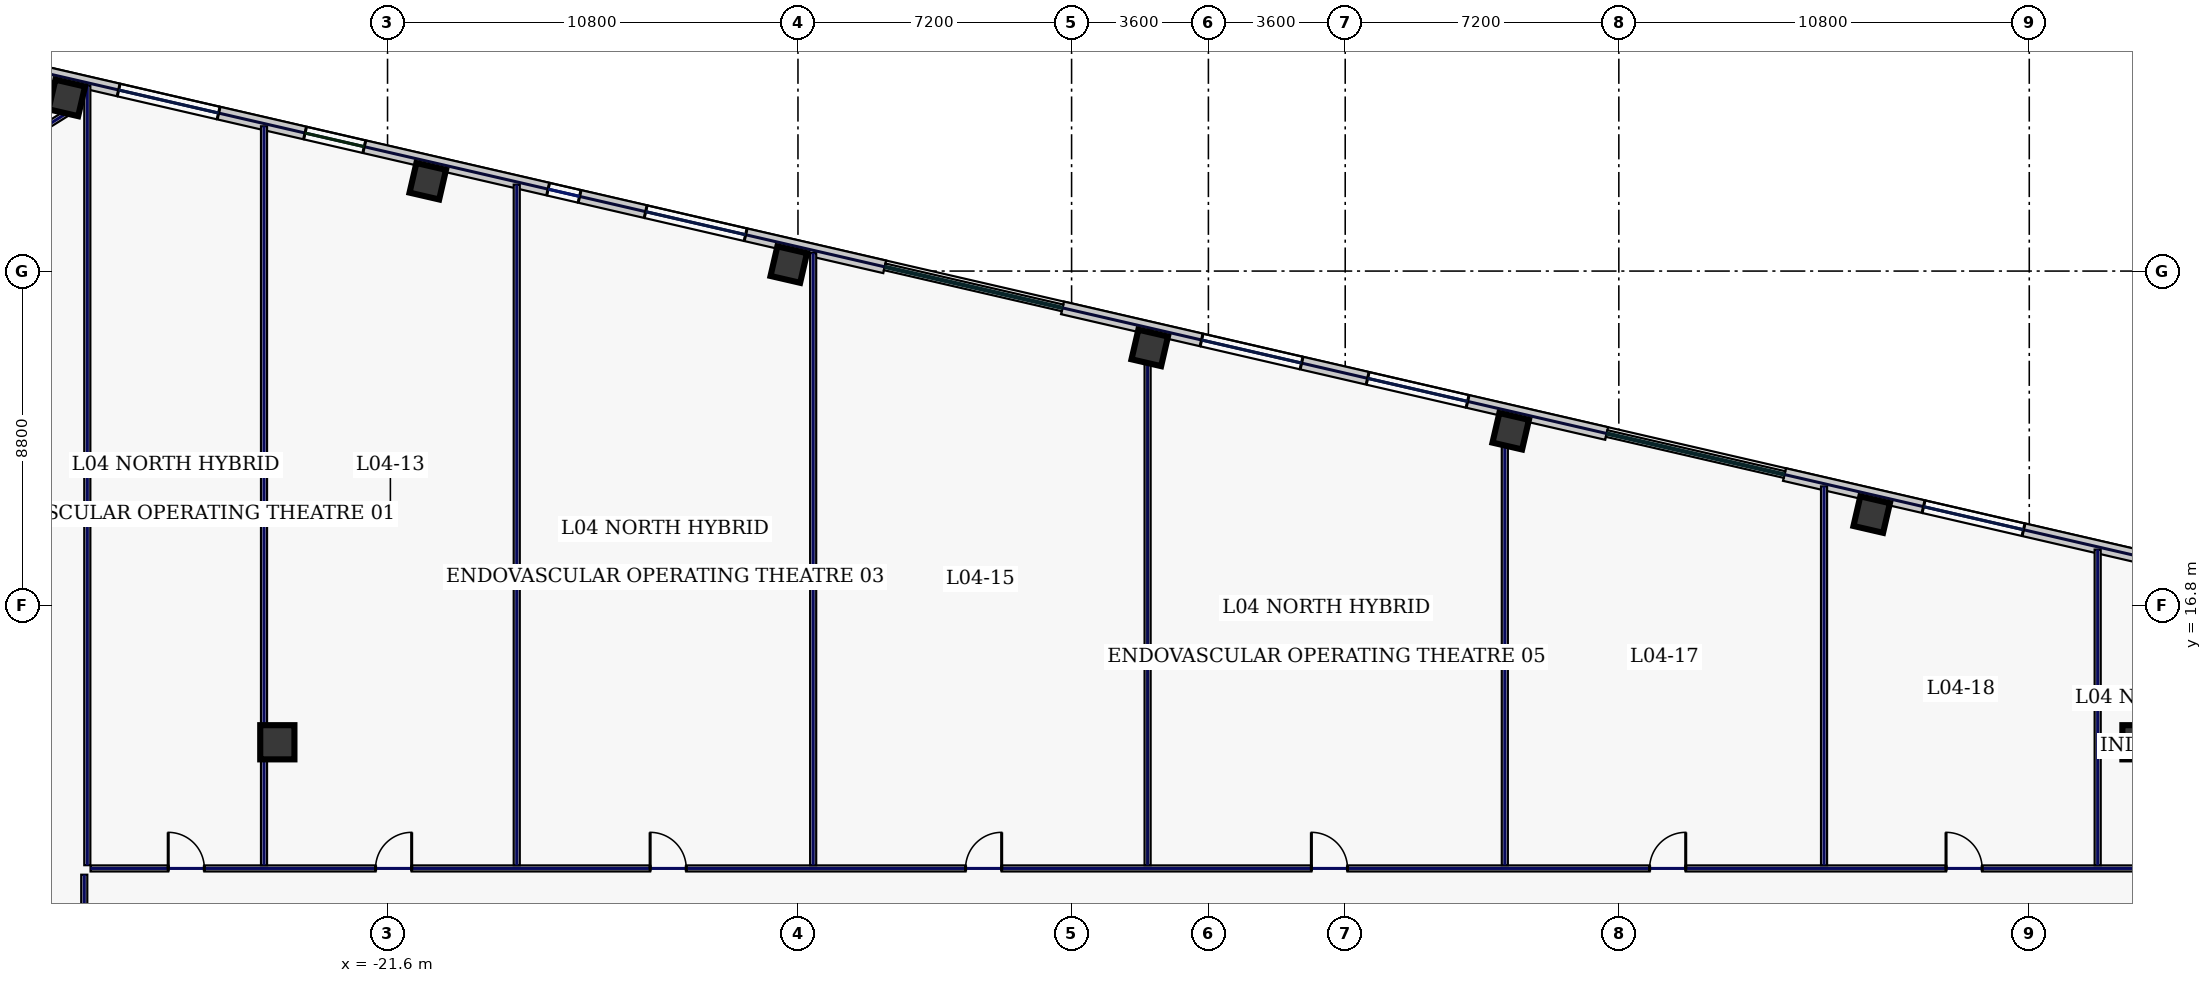
"""IFC4 building model, lengths in metres.
Left out: names, types, materials, properties, quantities, classifications, styles, units other than length and angle.
Written with IfcOpenShell. Run it as: python <this file> out.ifc"""

import sys

from ifc_helpers import new_model, si_unit, direction, frame, frame_2d, origin, origin_2d, place, context, subcontext, project, spatial, rectangle, hollow_rectangle, extrude, element, fill, save


model = new_model("IFC4")
c1 = context("Model", 3, precision=1e-05, world=origin(), true_north=direction((0.0, 1.0)))
c2 = subcontext(c1, "Body", "Model", "MODEL_VIEW")
j1 = project(units=[si_unit("LENGTHUNIT", "METRE"), si_unit("PLANEANGLEUNIT", "RADIAN")], contexts=[c1])
p1 = place(None, origin())
s1 = spatial("IfcSite", under=j1, at=p1, CompositionType="ELEMENT")
p2 = place(p1, origin())
s2 = spatial("IfcBuilding", under=s1, at=p2, CompositionType="ELEMENT")
p3 = place(p2, frame((0.0, 0.0, 23.4)))
s3 = spatial("IfcBuildingStorey", under=s2, at=p3, CompositionType="ELEMENT", Elevation=23.4)
for number, where, z_axis, x_axis in (
    (1, (-24.5, 13.2, 0.0), (0.0, 0.0, 1.0), (1.0, 0.0, 0.0)),
    (2, (24.5, 13.2, 0.0), (0.0, 0.0, 1.0), (1.0, 0.0, 0.0)),
):
    element("IfcColumn", number, at=place(p3, frame(where, z_axis=z_axis, x_axis=x_axis)), inside=s3, PredefinedType="COLUMN", context=c2, shape_type="SweptSolid", body=[
        extrude(hollow_rectangle(XDim=0.9, YDim=0.9, WallThickness=0.04, at=origin_2d()), origin(), (0.0, 0.0, 1.0), 4.7),
    ])
for number, where, z_axis, x_axis in (
    (3, (17.454, 19.192, 0.0), (0.0, 0.0, 1.0), (0.974, -0.225, 0.0)),
    (4, (7.955, 21.385, 0.0), (0.0, 0.0, 1.0), (0.974, -0.225, 0.0)),
    (5, (-1.544, 23.578, 0.0), (0.0, 0.0, 1.0), (0.974, -0.225, 0.0)),
    (6, (-11.042, 25.771, 0.0), (0.0, 0.0, 1.0), (0.974, -0.225, 0.0)),
    (7, (-20.541, 27.964, 0.0), (0.0, 0.0, 1.0), (0.974, -0.225, 0.0)),
    (8, (-30.04, 30.156, 0.0), (0.0, 0.0, 1.0), (0.974, -0.225, 0.0)),
):
    element("IfcColumn", number, at=place(p3, frame(where, z_axis=z_axis, x_axis=x_axis)), inside=s3, PredefinedType="COLUMN", context=c2, shape_type="SweptSolid", body=[
        extrude(hollow_rectangle(XDim=0.8, YDim=0.8, WallThickness=0.036, at=origin_2d()), origin(), (0.0, 0.0, 1.0), 4.7),
    ])
p4 = place(p3, frame((37.229, 15.15, 0.0), z_axis=(0.0, 0.0, 1.0), x_axis=(-0.97436993772, 0.224951604723, 0.0)))
e9 = element("IfcWall", 9, at=p4, inside=s3, PredefinedType="STANDARD", context=c2, shape_type="SweptSolid", body=[
    extrude(rectangle(XDim=22.651, YDim=0.34, at=frame_2d((11.326, 0.0))), origin(), (0.0, 0.0, 1.0), 4.7),
])
p5 = place(p4, frame((16.195, 0.0, 0.9)))
e10 = element("IfcOpeningElement", 10, at=p5, cuts=e9, PredefinedType="OPENING", context=c2, shape_type="SweptSolid", body=[
    extrude(rectangle(XDim=2.7, YDim=2.2, at=frame_2d((1.35, 1.1))), frame((0.0, 0.18, 0.0), z_axis=(0.0, -1.0, 0.0), x_axis=(1.0, 0.0, 0.0)), (0.0, 0.0, 1.0), 0.36),
])
p6 = place(p4, frame((11.711, 0.0, 0.9)))
e11 = element("IfcOpeningElement", 11, at=p6, cuts=e9, PredefinedType="OPENING", context=c2, shape_type="SweptSolid", body=[
    extrude(rectangle(XDim=0.85, YDim=1.85, at=frame_2d((0.425, 0.925))), frame((0.0, 0.18, 0.0), z_axis=(0.0, -1.0, 0.0), x_axis=(1.0, 0.0, 0.0)), (0.0, 0.0, 1.0), 0.36),
])
p7 = place(p4, frame((6.447, 0.0, 0.9)))
e12 = element("IfcOpeningElement", 12, at=p7, cuts=e9, PredefinedType="OPENING", context=c2, shape_type="SweptSolid", body=[
    extrude(rectangle(XDim=0.85, YDim=1.85, at=frame_2d((0.425, 0.925))), frame((0.0, 0.18, 0.0), z_axis=(0.0, -1.0, 0.0), x_axis=(1.0, 0.0, 0.0)), (0.0, 0.0, 1.0), 0.36),
])
p8 = place(p4, frame((1.962, 0.0, 0.9)))
e13 = element("IfcOpeningElement", 13, at=p8, cuts=e9, PredefinedType="OPENING", context=c2, shape_type="SweptSolid", body=[
    extrude(rectangle(XDim=2.7, YDim=2.2, at=frame_2d((1.35, 1.1))), frame((0.0, 0.18, 0.0), z_axis=(0.0, -1.0, 0.0), x_axis=(1.0, 0.0, 0.0)), (0.0, 0.0, 1.0), 0.36),
])
p9 = place(p3, frame((10.481, 21.325, 0.0), z_axis=(0.0, 0.0, 1.0), x_axis=(-0.974369353393, 0.2249541357, 0.0)))
e14 = element("IfcWall", 14, at=p9, inside=s3, PredefinedType="STANDARD", context=c2, shape_type="SweptSolid", body=[
    extrude(rectangle(XDim=14.697, YDim=0.34, at=frame_2d((7.349, 0.0))), origin(), (0.0, 0.0, 1.0), 4.7),
])
p10 = place(p9, frame((8.241, 0.0, 0.9)))
e15 = element("IfcOpeningElement", 15, at=p10, cuts=e14, PredefinedType="OPENING", context=c2, shape_type="SweptSolid", body=[
    extrude(rectangle(XDim=2.7, YDim=2.2, at=frame_2d((1.35, 1.1))), frame((0.0, 0.18, 0.0), z_axis=(0.0, -1.0, 0.0), x_axis=(1.0, 0.0, 0.0)), (0.0, 0.0, 1.0), 0.36),
])
p11 = place(p9, frame((3.756, 0.0, 0.9)))
e16 = element("IfcOpeningElement", 16, at=p11, cuts=e14, PredefinedType="OPENING", context=c2, shape_type="SweptSolid", body=[
    extrude(rectangle(XDim=2.7, YDim=2.2, at=frame_2d((1.35, 1.1))), frame((0.0, 0.18, 0.0), z_axis=(0.0, -1.0, 0.0), x_axis=(1.0, 0.0, 0.0)), (0.0, 0.0, 1.0), 0.36),
])
p12 = place(p3, frame((-8.517, 25.711, 0.0), z_axis=(0.0, 0.0, 1.0), x_axis=(-0.974372845456, 0.224939009598, 0.0)))
e17 = element("IfcWall", 17, at=p12, inside=s3, PredefinedType="STANDARD", context=c2, shape_type="SweptSolid", body=[
    extrude(rectangle(XDim=22.652, YDim=0.34, at=frame_2d((11.326, 0.0))), origin(), (0.0, 0.0, 1.0), 4.7),
])
p13 = place(p12, frame((17.989, 0.0, 0.9)))
e18 = element("IfcOpeningElement", 18, at=p13, cuts=e17, PredefinedType="OPENING", context=c2, shape_type="SweptSolid", body=[
    extrude(rectangle(XDim=2.7, YDim=2.2, at=frame_2d((1.35, 1.1))), frame((0.0, 0.18, 0.0), z_axis=(0.0, -1.0, 0.0), x_axis=(1.0, 0.0, 0.0)), (0.0, 0.0, 1.0), 0.36),
])
p14 = place(p12, frame((14.055, 0.0, 0.22)))
e19 = element("IfcOpeningElement", 19, at=p14, cuts=e17, PredefinedType="OPENING", context=c2, shape_type="SweptSolid", body=[
    extrude(rectangle(XDim=1.6, YDim=1.2, at=frame_2d((0.8, 0.6))), frame((0.0, 0.18, 0.0), z_axis=(0.0, -1.0, 0.0), x_axis=(1.0, 0.0, 0.0)), (0.0, 0.0, 1.0), 0.36),
])
p15 = place(p12, frame((8.241, 0.0, 0.9)))
e20 = element("IfcOpeningElement", 20, at=p15, cuts=e17, PredefinedType="OPENING", context=c2, shape_type="SweptSolid", body=[
    extrude(rectangle(XDim=0.85, YDim=1.85, at=frame_2d((0.425, 0.925))), frame((0.0, 0.18, 0.0), z_axis=(0.0, -1.0, 0.0), x_axis=(1.0, 0.0, 0.0)), (0.0, 0.0, 1.0), 0.36),
])
p16 = place(p12, frame((3.756, 0.0, 0.9)))
e21 = element("IfcOpeningElement", 21, at=p16, cuts=e17, PredefinedType="OPENING", context=c2, shape_type="SweptSolid", body=[
    extrude(rectangle(XDim=2.7, YDim=2.2, at=frame_2d((1.35, 1.1))), frame((0.0, 0.18, 0.0), z_axis=(0.0, -1.0, 0.0), x_axis=(1.0, 0.0, 0.0)), (0.0, 0.0, 1.0), 0.36),
])
p17 = place(p3, frame((-29.86, 29.868, 0.0), z_axis=(0.0, 0.0, 1.0), x_axis=(-0.848043064089, -0.529927317139, 0.0)))
e22 = element("IfcWall", 22, at=p17, inside=s3, PredefinedType="PARTITIONING", context=c2, shape_type="SweptSolid", body=[
    extrude(rectangle(XDim=7.354, YDim=0.16, at=frame_2d((3.677, 0.0))), origin(), (0.0, 0.0, 1.0), 4.7),
])
p18 = place(p3, frame((-29.58, -9.715, 0.0), z_axis=(0.0, 0.0, 1.0), x_axis=(0.0, 1.0, 0.0)))
e23 = element("IfcWall", 23, at=p18, inside=s3, PredefinedType="PARTITIONING", context=c2, shape_type="SweptSolid", body=[
    extrude(rectangle(XDim=19.43, YDim=0.16, at=frame_2d((9.715, 0.0))), origin(), (0.0, 0.0, 1.0), 4.7),
])
p19 = place(p18, frame((2.019, 0.0, 0.0)))
e24 = element("IfcOpeningElement", 24, at=p19, cuts=e23, PredefinedType="OPENING", context=c2, shape_type="SweptSolid", body=[
    extrude(rectangle(XDim=0.95, YDim=2.2, at=frame_2d((0.475, 1.1))), frame((0.0, 0.09, 0.0), z_axis=(0.0, -1.0, 0.0), x_axis=(1.0, 0.0, 0.0)), (0.0, 0.0, 1.0), 0.18),
])
p20 = place(p18, frame((6.725, 0.0, 0.0)))
e25 = element("IfcOpeningElement", 25, at=p20, cuts=e23, PredefinedType="OPENING", context=c2, shape_type="SweptSolid", body=[
    extrude(rectangle(XDim=0.95, YDim=2.2, at=frame_2d((0.475, 1.1))), frame((0.0, 0.09, 0.0), z_axis=(0.0, -1.0, 0.0), x_axis=(1.0, 0.0, 0.0)), (0.0, 0.0, 1.0), 0.18),
])
p21 = place(p18, frame((11.925, 0.0, 0.0)))
e26 = element("IfcOpeningElement", 26, at=p21, cuts=e23, PredefinedType="OPENING", context=c2, shape_type="SweptSolid", body=[
    extrude(rectangle(XDim=0.95, YDim=2.2, at=frame_2d((0.475, 1.1))), frame((0.0, 0.09, 0.0), z_axis=(0.0, -1.0, 0.0), x_axis=(1.0, 0.0, 0.0)), (0.0, 0.0, 1.0), 0.18),
])
p22 = place(p18, frame((16.631, 0.0, 0.0)))
e27 = element("IfcOpeningElement", 27, at=p22, cuts=e23, PredefinedType="OPENING", context=c2, shape_type="SweptSolid", body=[
    extrude(rectangle(XDim=0.95, YDim=2.2, at=frame_2d((0.475, 1.1))), frame((0.0, 0.09, 0.0), z_axis=(0.0, -1.0, 0.0), x_axis=(1.0, 0.0, 0.0)), (0.0, 0.0, 1.0), 0.18),
])
p23 = place(p3, frame((-29.415, 9.88, 0.0), z_axis=(0.0, 0.0, 1.0), x_axis=(1.0, 0.0, 0.0)))
e28 = element("IfcWall", 28, at=p23, inside=s3, PredefinedType="PARTITIONING", context=c2, shape_type="SweptSolid", body=[
    extrude(rectangle(XDim=58.83, YDim=0.16, at=frame_2d((29.415, 0.0))), origin(), (0.0, 0.0, 1.0), 4.7),
])
p24 = place(p23, frame((2.044, 0.0, 0.0)))
e29 = element("IfcOpeningElement", 29, at=p24, cuts=e28, PredefinedType="OPENING", context=c2, shape_type="SweptSolid", body=[
    extrude(rectangle(XDim=0.95, YDim=2.2, at=frame_2d((0.475, 1.1))), frame((0.0, 0.09, 0.0), z_axis=(0.0, -1.0, 0.0), x_axis=(1.0, 0.0, 0.0)), (0.0, 0.0, 1.0), 0.18),
])
p25 = place(p23, frame((7.5, 0.0, 0.0)))
e30 = element("IfcOpeningElement", 30, at=p25, cuts=e28, PredefinedType="OPENING", context=c2, shape_type="SweptSolid", body=[
    extrude(rectangle(XDim=0.95, YDim=2.2, at=frame_2d((0.475, 1.1))), frame((0.0, 0.09, 0.0), z_axis=(0.0, -1.0, 0.0), x_axis=(1.0, 0.0, 0.0)), (0.0, 0.0, 1.0), 0.18),
])
p26 = place(p23, frame((14.725, 0.0, 0.0)))
e31 = element("IfcOpeningElement", 31, at=p26, cuts=e28, PredefinedType="OPENING", context=c2, shape_type="SweptSolid", body=[
    extrude(rectangle(XDim=0.95, YDim=2.2, at=frame_2d((0.475, 1.1))), frame((0.0, 0.09, 0.0), z_axis=(0.0, -1.0, 0.0), x_axis=(1.0, 0.0, 0.0)), (0.0, 0.0, 1.0), 0.18),
])
p27 = place(p23, frame((23.025, 0.0, 0.0)))
e32 = element("IfcOpeningElement", 32, at=p27, cuts=e28, PredefinedType="OPENING", context=c2, shape_type="SweptSolid", body=[
    extrude(rectangle(XDim=0.95, YDim=2.2, at=frame_2d((0.475, 1.1))), frame((0.0, 0.09, 0.0), z_axis=(0.0, -1.0, 0.0), x_axis=(1.0, 0.0, 0.0)), (0.0, 0.0, 1.0), 0.18),
])
p28 = place(p23, frame((32.125, 0.0, 0.0)))
e33 = element("IfcOpeningElement", 33, at=p28, cuts=e28, PredefinedType="OPENING", context=c2, shape_type="SweptSolid", body=[
    extrude(rectangle(XDim=0.95, YDim=2.2, at=frame_2d((0.475, 1.1))), frame((0.0, 0.09, 0.0), z_axis=(0.0, -1.0, 0.0), x_axis=(1.0, 0.0, 0.0)), (0.0, 0.0, 1.0), 0.18),
])
p29 = place(p23, frame((41.025, 0.0, 0.0)))
e34 = element("IfcOpeningElement", 34, at=p29, cuts=e28, PredefinedType="OPENING", context=c2, shape_type="SweptSolid", body=[
    extrude(rectangle(XDim=0.95, YDim=2.2, at=frame_2d((0.475, 1.1))), frame((0.0, 0.09, 0.0), z_axis=(0.0, -1.0, 0.0), x_axis=(1.0, 0.0, 0.0)), (0.0, 0.0, 1.0), 0.18),
])
p30 = place(p23, frame((48.825, 0.0, 0.0)))
e35 = element("IfcOpeningElement", 35, at=p30, cuts=e28, PredefinedType="OPENING", context=c2, shape_type="SweptSolid", body=[
    extrude(rectangle(XDim=0.95, YDim=2.2, at=frame_2d((0.475, 1.1))), frame((0.0, 0.09, 0.0), z_axis=(0.0, -1.0, 0.0), x_axis=(1.0, 0.0, 0.0)), (0.0, 0.0, 1.0), 0.18),
])
p31 = place(p23, frame((55.281, 0.0, 0.0)))
e36 = element("IfcOpeningElement", 36, at=p31, cuts=e28, PredefinedType="OPENING", context=c2, shape_type="SweptSolid", body=[
    extrude(rectangle(XDim=0.95, YDim=2.2, at=frame_2d((0.475, 1.1))), frame((0.0, 0.09, 0.0), z_axis=(0.0, -1.0, 0.0), x_axis=(1.0, 0.0, 0.0)), (0.0, 0.0, 1.0), 0.18),
])
p32 = place(p3, frame((-29.5, 9.965, 0.0), z_axis=(0.0, 0.0, 1.0), x_axis=(0.0, 1.0, 0.0)))
e37 = element("IfcWall", 37, at=p32, inside=s3, PredefinedType="PARTITIONING", context=c2, shape_type="SweptSolid", body=[
    extrude(rectangle(XDim=20.519, YDim=0.16, at=frame_2d((10.259, 0.0))), origin(), (0.0, 0.0, 1.0), 4.7),
])
p33 = place(p3, frame((-24.85, 9.965, 0.0), z_axis=(0.0, 0.0, 1.0), x_axis=(0.0, 1.0, 0.0)))
e38 = element("IfcWall", 38, at=p33, inside=s3, PredefinedType="PARTITIONING", context=c2, shape_type="SweptSolid", body=[
    extrude(rectangle(XDim=19.445, YDim=0.16, at=frame_2d((9.723, 0.0))), origin(), (0.0, 0.0, 1.0), 4.7),
])
p34 = place(p3, frame((-18.2, 9.965, 0.0), z_axis=(0.0, 0.0, 1.0), x_axis=(0.0, 1.0, 0.0)))
e39 = element("IfcWall", 39, at=p34, inside=s3, PredefinedType="PARTITIONING", context=c2, shape_type="SweptSolid", body=[
    extrude(rectangle(XDim=17.91, YDim=0.16, at=frame_2d((8.955, 0.0))), origin(), (0.0, 0.0, 1.0), 4.7),
])
p35 = place(p3, frame((-10.4, 9.965, 0.0), z_axis=(0.0, 0.0, 1.0), x_axis=(0.0, 1.0, 0.0)))
e40 = element("IfcWall", 40, at=p35, inside=s3, PredefinedType="PARTITIONING", context=c2, shape_type="SweptSolid", body=[
    extrude(rectangle(XDim=16.109, YDim=0.16, at=frame_2d((8.054, 0.0))), origin(), (0.0, 0.0, 1.0), 4.7),
])
p36 = place(p3, frame((-1.6, 9.965, 0.0), z_axis=(0.0, 0.0, 1.0), x_axis=(0.0, 1.0, 0.0)))
e41 = element("IfcWall", 41, at=p36, inside=s3, PredefinedType="PARTITIONING", context=c2, shape_type="SweptSolid", body=[
    extrude(rectangle(XDim=14.077, YDim=0.16, at=frame_2d((7.039, 0.0))), origin(), (0.0, 0.0, 1.0), 4.195),
])
p37 = place(p3, frame((7.8, 9.965, 0.0), z_axis=(0.0, 0.0, 1.0), x_axis=(0.0, 1.0, 0.0)))
e42 = element("IfcWall", 42, at=p37, inside=s3, PredefinedType="PARTITIONING", context=c2, shape_type="SweptSolid", body=[
    extrude(rectangle(XDim=11.907, YDim=0.16, at=frame_2d((5.954, 0.0))), origin(), (0.0, 0.0, 1.0), 4.7),
])
p38 = place(p3, frame((16.2, 9.965, 0.0), z_axis=(0.0, 0.0, 1.0), x_axis=(0.0, 1.0, 0.0)))
e43 = element("IfcWall", 43, at=p38, inside=s3, PredefinedType="PARTITIONING", context=c2, shape_type="SweptSolid", body=[
    extrude(rectangle(XDim=9.968, YDim=0.16, at=frame_2d((4.984, 0.0))), origin(), (0.0, 0.0, 1.0), 4.7),
])
p39 = place(p3, frame((23.4, 9.965, 0.0), z_axis=(0.0, 0.0, 1.0), x_axis=(0.0, 1.0, 0.0)))
e44 = element("IfcWall", 44, at=p39, inside=s3, PredefinedType="PARTITIONING", context=c2, shape_type="SweptSolid", body=[
    extrude(rectangle(XDim=8.306, YDim=0.16, at=frame_2d((4.153, 0.0))), origin(), (0.0, 0.0, 1.0), 4.7),
])
p40 = place(p5, origin())
e45 = element("IfcWindow", 45, at=p40, inside=s3, PartitioningType="SINGLE_PANEL", PredefinedType="WINDOW", context=c2, shape_type="SweptSolid", body=[
    extrude(rectangle(XDim=2.7, YDim=2.2, at=frame_2d((1.35, 1.1))), frame((0.0, 0.03, 0.0), z_axis=(0.0, -1.0, 0.0), x_axis=(1.0, 0.0, 0.0)), (0.0, 0.0, 1.0), 0.06),
])
fill(e10, e45)
p41 = place(p10, origin())
e46 = element("IfcWindow", 46, at=p41, inside=s3, PartitioningType="SINGLE_PANEL", PredefinedType="WINDOW", context=c2, shape_type="SweptSolid", body=[
    extrude(rectangle(XDim=2.7, YDim=2.2, at=frame_2d((1.35, 1.1))), frame((0.0, 0.03, 0.0), z_axis=(0.0, -1.0, 0.0), x_axis=(1.0, 0.0, 0.0)), (0.0, 0.0, 1.0), 0.06),
])
fill(e15, e46)
p42 = place(p11, origin())
e47 = element("IfcWindow", 47, at=p42, inside=s3, PartitioningType="SINGLE_PANEL", PredefinedType="WINDOW", context=c2, shape_type="SweptSolid", body=[
    extrude(rectangle(XDim=2.7, YDim=2.2, at=frame_2d((1.35, 1.1))), frame((0.0, 0.03, 0.0), z_axis=(0.0, -1.0, 0.0), x_axis=(1.0, 0.0, 0.0)), (0.0, 0.0, 1.0), 0.06),
])
fill(e16, e47)
p43 = place(p13, origin())
e48 = element("IfcWindow", 48, at=p43, inside=s3, PartitioningType="SINGLE_PANEL", PredefinedType="WINDOW", context=c2, shape_type="SweptSolid", body=[
    extrude(rectangle(XDim=2.7, YDim=2.2, at=frame_2d((1.35, 1.1))), frame((0.0, 0.03, 0.0), z_axis=(0.0, -1.0, 0.0), x_axis=(1.0, 0.0, 0.0)), (0.0, 0.0, 1.0), 0.06),
])
fill(e18, e48)
p44 = place(p14, origin())
e49 = element("IfcWindow", 49, at=p44, inside=s3, PartitioningType="SINGLE_PANEL", PredefinedType="WINDOW", context=c2, shape_type="SweptSolid", body=[
    extrude(rectangle(XDim=1.6, YDim=1.2, at=frame_2d((0.8, 0.6))), frame((0.0, 0.03, 0.0), z_axis=(0.0, -1.0, 0.0), x_axis=(1.0, 0.0, 0.0)), (0.0, 0.0, 1.0), 0.06),
])
fill(e19, e49)
p45 = place(p15, origin())
e50 = element("IfcWindow", 50, at=p45, inside=s3, PartitioningType="SINGLE_PANEL", PredefinedType="WINDOW", context=c2, shape_type="SweptSolid", body=[
    extrude(rectangle(XDim=0.85, YDim=1.85, at=frame_2d((0.425, 0.925))), frame((0.0, 0.03, 0.0), z_axis=(0.0, -1.0, 0.0), x_axis=(1.0, 0.0, 0.0)), (0.0, 0.0, 1.0), 0.06),
])
fill(e20, e50)
p46 = place(p16, origin())
e51 = element("IfcWindow", 51, at=p46, inside=s3, PartitioningType="SINGLE_PANEL", PredefinedType="WINDOW", context=c2, shape_type="SweptSolid", body=[
    extrude(rectangle(XDim=2.7, YDim=2.2, at=frame_2d((1.35, 1.1))), frame((0.0, 0.03, 0.0), z_axis=(0.0, -1.0, 0.0), x_axis=(1.0, 0.0, 0.0)), (0.0, 0.0, 1.0), 0.06),
])
fill(e21, e51)
p47 = place(p24, origin())
e52 = element("IfcDoor", 52, at=p47, inside=s3, OperationType="SINGLE_SWING_LEFT", PredefinedType="DOOR", context=c2, shape_type="SweptSolid", body=[
    extrude(rectangle(XDim=0.95, YDim=2.2, at=frame_2d((0.475, 1.1))), frame((0.0, 0.025, 0.0), z_axis=(0.0, -1.0, 0.0), x_axis=(1.0, 0.0, 0.0)), (0.0, 0.0, 1.0), 0.05),
])
fill(e29, e52)
p48 = place(p25, origin())
e53 = element("IfcDoor", 53, at=p48, inside=s3, OperationType="SINGLE_SWING_RIGHT", PredefinedType="DOOR", context=c2, shape_type="SweptSolid", body=[
    extrude(rectangle(XDim=0.95, YDim=2.2, at=frame_2d((0.475, 1.1))), frame((0.0, 0.025, 0.0), z_axis=(0.0, -1.0, 0.0), x_axis=(1.0, 0.0, 0.0)), (0.0, 0.0, 1.0), 0.05),
])
fill(e30, e53)
p49 = place(p26, origin())
e54 = element("IfcDoor", 54, at=p49, inside=s3, OperationType="SINGLE_SWING_LEFT", PredefinedType="DOOR", context=c2, shape_type="SweptSolid", body=[
    extrude(rectangle(XDim=0.95, YDim=2.2, at=frame_2d((0.475, 1.1))), frame((0.0, 0.025, 0.0), z_axis=(0.0, -1.0, 0.0), x_axis=(1.0, 0.0, 0.0)), (0.0, 0.0, 1.0), 0.05),
])
fill(e31, e54)
p50 = place(p27, origin())
e55 = element("IfcDoor", 55, at=p50, inside=s3, OperationType="SINGLE_SWING_RIGHT", PredefinedType="DOOR", context=c2, shape_type="SweptSolid", body=[
    extrude(rectangle(XDim=0.95, YDim=2.2, at=frame_2d((0.475, 1.1))), frame((0.0, 0.025, 0.0), z_axis=(0.0, -1.0, 0.0), x_axis=(1.0, 0.0, 0.0)), (0.0, 0.0, 1.0), 0.05),
])
fill(e32, e55)
p51 = place(p28, origin())
e56 = element("IfcDoor", 56, at=p51, inside=s3, OperationType="SINGLE_SWING_LEFT", PredefinedType="DOOR", context=c2, shape_type="SweptSolid", body=[
    extrude(rectangle(XDim=0.95, YDim=2.2, at=frame_2d((0.475, 1.1))), frame((0.0, 0.025, 0.0), z_axis=(0.0, -1.0, 0.0), x_axis=(1.0, 0.0, 0.0)), (0.0, 0.0, 1.0), 0.05),
])
fill(e33, e56)
p52 = place(p29, origin())
e57 = element("IfcDoor", 57, at=p52, inside=s3, OperationType="SINGLE_SWING_RIGHT", PredefinedType="DOOR", context=c2, shape_type="SweptSolid", body=[
    extrude(rectangle(XDim=0.95, YDim=2.2, at=frame_2d((0.475, 1.1))), frame((0.0, 0.025, 0.0), z_axis=(0.0, -1.0, 0.0), x_axis=(1.0, 0.0, 0.0)), (0.0, 0.0, 1.0), 0.05),
])
fill(e34, e57)
p53 = place(p30, origin())
e58 = element("IfcDoor", 58, at=p53, inside=s3, OperationType="SINGLE_SWING_LEFT", PredefinedType="DOOR", context=c2, shape_type="SweptSolid", body=[
    extrude(rectangle(XDim=0.95, YDim=2.2, at=frame_2d((0.475, 1.1))), frame((0.0, 0.025, 0.0), z_axis=(0.0, -1.0, 0.0), x_axis=(1.0, 0.0, 0.0)), (0.0, 0.0, 1.0), 0.05),
])
fill(e35, e58)
save(model, sys.argv[1])
